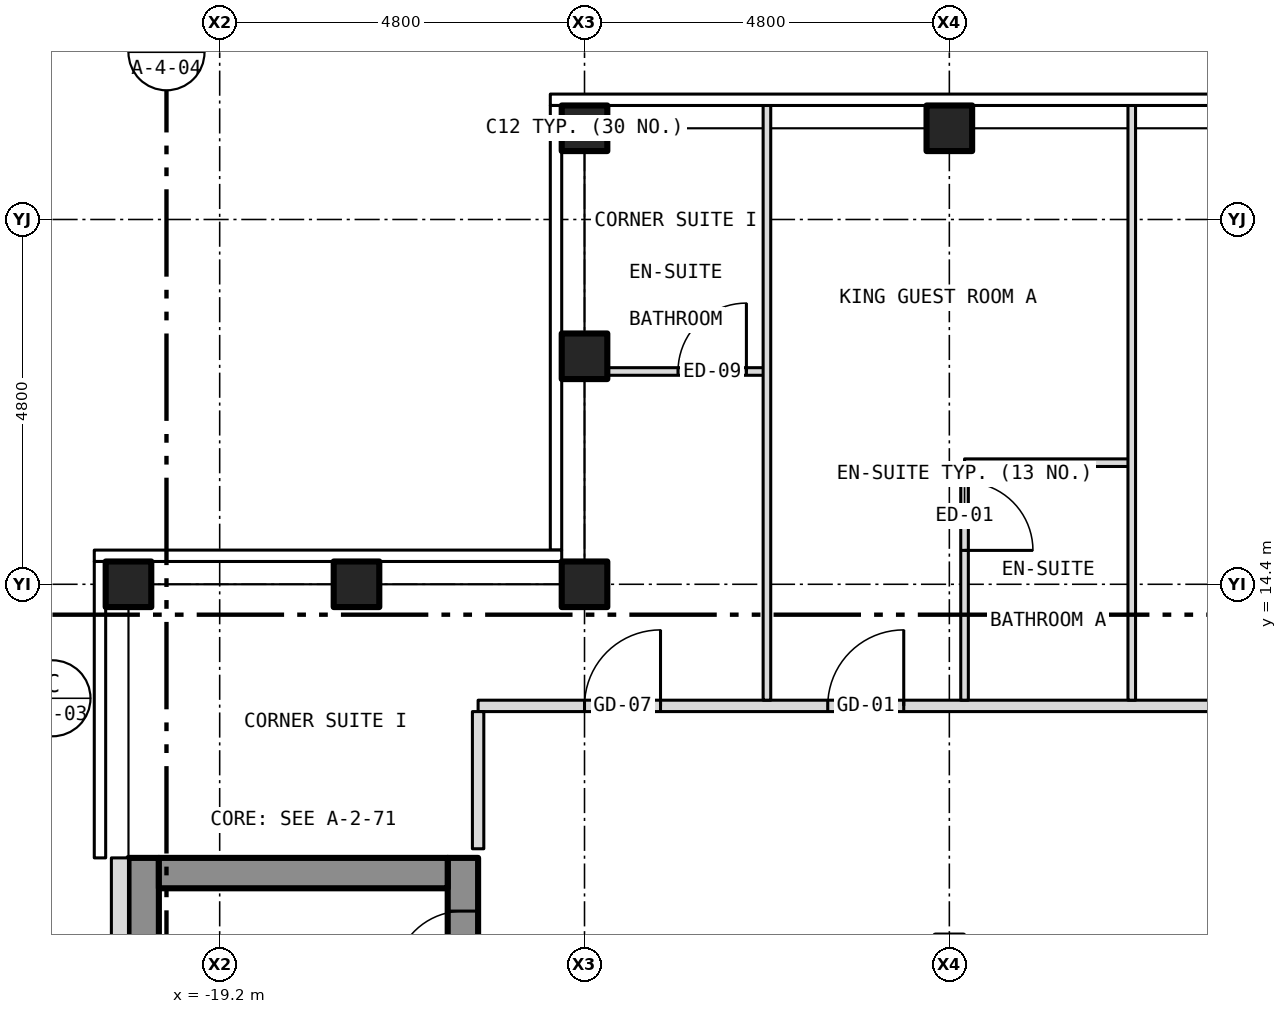
"""IFC4 building model, lengths in metres.
Left out: names, types, materials, properties, quantities, classifications, styles, units other than length and angle.
Written with IfcOpenShell. Run it as: python <this file> out.ifc"""

import sys

from ifc_helpers import new_model, si_unit, direction, frame, frame_2d, origin, origin_2d, place, context, subcontext, project, spatial, rectangle, hollow_rectangle, extrude, element, fill, save


model = new_model("IFC4")
c1 = context("Model", 3, precision=1e-05, world=origin(), true_north=direction((0.0, 1.0)))
c2 = subcontext(c1, "Body", "Model", "MODEL_VIEW")
j1 = project(units=[si_unit("LENGTHUNIT", "METRE"), si_unit("PLANEANGLEUNIT", "RADIAN")], contexts=[c1])
p1 = place(None, origin())
s1 = spatial("IfcSite", under=j1, at=p1, CompositionType="ELEMENT")
p2 = place(p1, origin())
s2 = spatial("IfcBuilding", under=s1, at=p2, CompositionType="ELEMENT")
p3 = place(p2, frame((0.0, 0.0, 258.5)))
s3 = spatial("IfcBuildingStorey", under=s2, at=p3, CompositionType="ELEMENT", Elevation=258.5)
for number, where, z_axis, x_axis in (
    (1, (-14.4, 20.4, -0.15), (0.0, 0.0, 1.0), (1.0, 0.0, 0.0)),
    (2, (-9.6, 20.4, -0.15), (0.0, 0.0, 1.0), (1.0, 0.0, 0.0)),
    (3, (-20.4, 14.4, -0.15), (0.0, 0.0, 1.0), (1.0, 0.0, 0.0)),
    (4, (-14.4, 14.4, -0.15), (0.0, 0.0, 1.0), (1.0, 0.0, 0.0)),
    (5, (-14.4, 17.4, -0.15), (0.0, 0.0, 1.0), (1.0, 0.0, 0.0)),
    (6, (-17.4, 14.4, -0.15), (0.0, 0.0, 1.0), (1.0, 0.0, 0.0)),
):
    element("IfcColumn", number, at=place(p3, frame(where, z_axis=z_axis, x_axis=x_axis)), inside=s3, PredefinedType="COLUMN", context=c2, shape_type="SweptSolid", body=[
        extrude(hollow_rectangle(XDim=0.6, YDim=0.6, WallThickness=0.03, at=origin_2d()), origin(), (0.0, 0.0, 1.0), 3.5),
    ])
p4 = place(p3, frame((-16.0, -10.8, 0.0), z_axis=(0.0, 0.0, 1.0), x_axis=(0.0, 1.0, 0.0)))
e7 = element("IfcWall", 7, at=p4, inside=s3, PredefinedType="SHEAR", context=c2, shape_type="SweptSolid", body=[
    extrude(rectangle(XDim=21.6, YDim=0.4, at=frame_2d((10.8, 0.0))), origin(), (0.0, 0.0, 1.0), 3.25),
])
p5 = place(p4, frame((9.4, 0.0, 0.0)))
e8 = element("IfcOpeningElement", 8, at=p5, cuts=e7, PredefinedType="OPENING", context=c2, shape_type="SweptSolid", body=[
    extrude(rectangle(XDim=1.1, YDim=2.1, at=frame_2d((0.55, 1.05))), frame((0.0, 0.212, 0.0), z_axis=(0.0, -1.0, 0.0), x_axis=(1.0, 0.0, 0.0)), (0.0, 0.0, 1.0), 0.424),
])
p6 = place(p4, frame((11.5, 0.0, 0.0)))
e9 = element("IfcOpeningElement", 9, at=p6, cuts=e7, PredefinedType="OPENING", context=c2, shape_type="SweptSolid", body=[
    extrude(rectangle(XDim=1.1, YDim=2.1, at=frame_2d((0.55, 1.05))), frame((0.0, 0.212, 0.0), z_axis=(0.0, -1.0, 0.0), x_axis=(1.0, 0.0, 0.0)), (0.0, 0.0, 1.0), 0.424),
])
p7 = place(p4, frame((13.6, 0.0, 0.0)))
e10 = element("IfcOpeningElement", 10, at=p7, cuts=e7, PredefinedType="OPENING", context=c2, shape_type="SweptSolid", body=[
    extrude(rectangle(XDim=1.1, YDim=2.1, at=frame_2d((0.55, 1.05))), frame((0.0, 0.212, 0.0), z_axis=(0.0, -1.0, 0.0), x_axis=(1.0, 0.0, 0.0)), (0.0, 0.0, 1.0), 0.424),
])
p8 = place(p4, frame((15.7, 0.0, 0.0)))
e11 = element("IfcOpeningElement", 11, at=p8, cuts=e7, PredefinedType="OPENING", context=c2, shape_type="SweptSolid", body=[
    extrude(rectangle(XDim=1.1, YDim=2.1, at=frame_2d((0.55, 1.05))), frame((0.0, 0.212, 0.0), z_axis=(0.0, -1.0, 0.0), x_axis=(1.0, 0.0, 0.0)), (0.0, 0.0, 1.0), 0.424),
])
p9 = place(p4, frame((17.8, 0.0, 0.0)))
e12 = element("IfcOpeningElement", 12, at=p9, cuts=e7, PredefinedType="OPENING", context=c2, shape_type="SweptSolid", body=[
    extrude(rectangle(XDim=1.1, YDim=2.1, at=frame_2d((0.55, 1.05))), frame((0.0, 0.212, 0.0), z_axis=(0.0, -1.0, 0.0), x_axis=(1.0, 0.0, 0.0)), (0.0, 0.0, 1.0), 0.424),
])
p10 = place(p4, frame((0.458, 0.0, 0.0)))
e13 = element("IfcOpeningElement", 13, at=p10, cuts=e7, PredefinedType="OPENING", context=c2, shape_type="SweptSolid", body=[
    extrude(rectangle(XDim=1.1, YDim=2.1, at=frame_2d((0.55, 1.05))), frame((0.0, 0.212, 0.0), z_axis=(0.0, -1.0, 0.0), x_axis=(1.0, 0.0, 0.0)), (0.0, 0.0, 1.0), 0.424),
])
p11 = place(p4, frame((7.5, 0.0, 0.0)))
e14 = element("IfcOpeningElement", 14, at=p11, cuts=e7, PredefinedType="OPENING", context=c2, shape_type="SweptSolid", body=[
    extrude(rectangle(XDim=1.1, YDim=2.1, at=frame_2d((0.55, 1.05))), frame((0.0, 0.212, 0.0), z_axis=(0.0, -1.0, 0.0), x_axis=(1.0, 0.0, 0.0)), (0.0, 0.0, 1.0), 0.424),
])
p12 = place(p4, frame((20.0, 0.0, 0.0)))
e15 = element("IfcOpeningElement", 15, at=p12, cuts=e7, PredefinedType="OPENING", context=c2, shape_type="SweptSolid", body=[
    extrude(rectangle(XDim=0.9, YDim=2.1, at=frame_2d((0.45, 1.05))), frame((0.0, 0.212, 0.0), z_axis=(0.0, -1.0, 0.0), x_axis=(1.0, 0.0, 0.0)), (0.0, 0.0, 1.0), 0.424),
])
p13 = place(p3, frame((-20.2, -10.8, 0.0), z_axis=(0.0, 0.0, 1.0), x_axis=(0.0, 1.0, 0.0)))
e16 = element("IfcWall", 16, at=p13, inside=s3, PredefinedType="SHEAR", context=c2, shape_type="SweptSolid", body=[
    extrude(rectangle(XDim=21.6, YDim=0.4, at=frame_2d((10.8, 0.0))), origin(), (0.0, 0.0, 1.0), 3.25),
])
p14 = place(p3, frame((-20.0, 10.6, 0.0), z_axis=(0.0, 0.0, 1.0), x_axis=(1.0, 0.0, 0.0)))
e17 = element("IfcWall", 17, at=p14, inside=s3, PredefinedType="SHEAR", context=c2, shape_type="SweptSolid", body=[
    extrude(rectangle(XDim=3.8, YDim=0.4, at=frame_2d((1.9, 0.0))), origin(), (0.0, 0.0, 1.0), 3.25),
])
p15 = place(p3, frame((-20.512, 10.8, 0.0), z_axis=(0.0, 0.0, 1.0), x_axis=(0.0, -1.0, 0.0)))
e18 = element("IfcWall", 18, at=p15, inside=s3, PredefinedType="SOLIDWALL", context=c2, shape_type="SweptSolid", body=[
    extrude(rectangle(XDim=21.6, YDim=0.225, at=frame_2d((10.8, 0.0))), origin(), (0.0, 0.0, 1.0), 3.5),
])
p16 = place(p15, frame((18.05, 0.0, 1.0)))
e19 = element("IfcOpeningElement", 19, at=p16, cuts=e18, PredefinedType="OPENING", context=c2, shape_type="SweptSolid", body=[
    extrude(rectangle(XDim=0.6, YDim=1.5, at=frame_2d((0.3, 0.75))), frame((0.0, 0.125, 0.0), z_axis=(0.0, -1.0, 0.0), x_axis=(1.0, 0.0, 0.0)), (0.0, 0.0, 1.0), 0.249),
])
p17 = place(p3, frame((-15.8, 12.8, 0.0), z_axis=(0.0, 0.0, 1.0), x_axis=(1.0, 0.0, 0.0)))
e20 = element("IfcWall", 20, at=p17, inside=s3, PredefinedType="PARTITIONING", context=c2, shape_type="SweptSolid", body=[
    extrude(rectangle(XDim=31.6, YDim=0.15, at=frame_2d((15.8, 0.0))), origin(), (0.0, 0.0, 1.0), 3.35),
])
p18 = place(p17, frame((4.6, 0.0, 0.0)))
e21 = element("IfcOpeningElement", 21, at=p18, cuts=e20, PredefinedType="OPENING", context=c2, shape_type="SweptSolid", body=[
    extrude(rectangle(XDim=1.0, YDim=2.1, at=frame_2d((0.5, 1.05))), frame((0.0, 0.087, 0.0), z_axis=(0.0, -1.0, 0.0), x_axis=(1.0, 0.0, 0.0)), (0.0, 0.0, 1.0), 0.174),
])
p19 = place(p17, frame((10.6, 0.0, 0.0)))
e22 = element("IfcOpeningElement", 22, at=p19, cuts=e20, PredefinedType="OPENING", context=c2, shape_type="SweptSolid", body=[
    extrude(rectangle(XDim=1.0, YDim=2.1, at=frame_2d((0.5, 1.05))), frame((0.0, 0.087, 0.0), z_axis=(0.0, -1.0, 0.0), x_axis=(1.0, 0.0, 0.0)), (0.0, 0.0, 1.0), 0.174),
])
p20 = place(p17, frame((17.8, 0.0, 0.0)))
e23 = element("IfcOpeningElement", 23, at=p20, cuts=e20, PredefinedType="OPENING", context=c2, shape_type="SweptSolid", body=[
    extrude(rectangle(XDim=1.0, YDim=2.1, at=frame_2d((0.5, 1.05))), frame((0.0, 0.087, 0.0), z_axis=(0.0, -1.0, 0.0), x_axis=(1.0, 0.0, 0.0)), (0.0, 0.0, 1.0), 0.174),
])
p21 = place(p17, frame((26.0, 0.0, 0.0)))
e24 = element("IfcOpeningElement", 24, at=p21, cuts=e20, PredefinedType="OPENING", context=c2, shape_type="SweptSolid", body=[
    extrude(rectangle(XDim=1.0, YDim=2.1, at=frame_2d((0.5, 1.05))), frame((0.0, 0.087, 0.0), z_axis=(0.0, -1.0, 0.0), x_axis=(1.0, 0.0, 0.0)), (0.0, 0.0, 1.0), 0.174),
])
p22 = place(p17, frame((1.4, 0.0, 0.0)))
e25 = element("IfcOpeningElement", 25, at=p22, cuts=e20, PredefinedType="OPENING", context=c2, shape_type="SweptSolid", body=[
    extrude(rectangle(XDim=1.0, YDim=2.1, at=frame_2d((0.5, 1.05))), frame((0.0, 0.087, 0.0), z_axis=(0.0, -1.0, 0.0), x_axis=(1.0, 0.0, 0.0)), (0.0, 0.0, 1.0), 0.174),
])
p23 = place(p17, frame((29.2, 0.0, 0.0)))
e26 = element("IfcOpeningElement", 26, at=p23, cuts=e20, PredefinedType="OPENING", context=c2, shape_type="SweptSolid", body=[
    extrude(rectangle(XDim=1.0, YDim=2.1, at=frame_2d((0.5, 1.05))), frame((0.0, 0.087, 0.0), z_axis=(0.0, -1.0, 0.0), x_axis=(1.0, 0.0, 0.0)), (0.0, 0.0, 1.0), 0.174),
])
p24 = place(p3, frame((-9.4, 16.0, 0.0), z_axis=(0.0, 0.0, 1.0), x_axis=(1.0, 0.0, 0.0)))
e27 = element("IfcWall", 27, at=p24, inside=s3, PredefinedType="PARTITIONING", context=c2, shape_type="SweptSolid", body=[
    extrude(rectangle(XDim=2.2, YDim=0.1, at=frame_2d((1.1, 0.0))), origin(), (0.0, 0.0, 1.0), 3.35),
])
p25 = place(p3, frame((-14.28, 17.2, 0.0), z_axis=(0.0, 0.0, 1.0), x_axis=(1.0, 0.0, 0.0)))
e28 = element("IfcWall", 28, at=p25, inside=s3, PredefinedType="PARTITIONING", context=c2, shape_type="SweptSolid", body=[
    extrude(rectangle(XDim=2.28, YDim=0.1, at=frame_2d((1.14, 0.0))), origin(), (0.0, 0.0, 1.0), 3.35),
])
p26 = place(p25, frame((1.11, 0.0, 0.0)))
e29 = element("IfcOpeningElement", 29, at=p26, cuts=e28, PredefinedType="OPENING", context=c2, shape_type="SweptSolid", body=[
    extrude(rectangle(XDim=0.9, YDim=2.1, at=frame_2d((0.45, 1.05))), frame((0.0, 0.062, 0.0), z_axis=(0.0, -1.0, 0.0), x_axis=(1.0, 0.0, 0.0)), (0.0, 0.0, 1.0), 0.124),
])
p27 = place(p3, frame((-15.8, 10.92, 0.0), z_axis=(0.0, 0.0, 1.0), x_axis=(0.0, 1.0, 0.0)))
e30 = element("IfcWall", 30, at=p27, inside=s3, PredefinedType="PARTITIONING", context=c2, shape_type="SweptSolid", body=[
    extrude(rectangle(XDim=1.805, YDim=0.15, at=frame_2d((0.903, 0.0))), origin(), (0.0, 0.0, 1.0), 3.35),
])
p28 = place(p3, frame((-12.0, 12.875, 0.0), z_axis=(0.0, 0.0, 1.0), x_axis=(0.0, 1.0, 0.0)))
e31 = element("IfcWall", 31, at=p28, inside=s3, PredefinedType="PARTITIONING", context=c2, shape_type="SweptSolid", body=[
    extrude(rectangle(XDim=7.855, YDim=0.1, at=frame_2d((3.927, 0.0))), origin(), (0.0, 0.0, 1.0), 3.35),
])
p29 = place(p3, frame((-9.4, 12.875, 0.0), z_axis=(0.0, 0.0, 1.0), x_axis=(0.0, 1.0, 0.0)))
e32 = element("IfcWall", 32, at=p29, inside=s3, PredefinedType="PARTITIONING", context=c2, shape_type="SweptSolid", body=[
    extrude(rectangle(XDim=3.075, YDim=0.1, at=frame_2d((1.538, 0.0))), origin(), (0.0, 0.0, 1.0), 2.728),
])
p30 = place(p29, frame((1.971, 0.0, 0.0)))
e33 = element("IfcOpeningElement", 33, at=p30, cuts=e32, PredefinedType="OPENING", context=c2, shape_type="SweptSolid", body=[
    extrude(rectangle(XDim=0.9, YDim=2.1, at=frame_2d((0.45, 1.05))), frame((0.0, 0.062, 0.0), z_axis=(0.0, -1.0, 0.0), x_axis=(1.0, 0.0, 0.0)), (0.0, 0.0, 1.0), 0.124),
])
p31 = place(p3, frame((-7.2, 12.875, 0.0), z_axis=(0.0, 0.0, 1.0), x_axis=(0.0, 1.0, 0.0)))
e34 = element("IfcWall", 34, at=p31, inside=s3, PredefinedType="PARTITIONING", context=c2, shape_type="SweptSolid", body=[
    extrude(rectangle(XDim=7.855, YDim=0.1, at=frame_2d((3.927, 0.0))), origin(), (0.0, 0.0, 1.0), 3.35),
])
p32 = place(p12, origin())
e35 = element("IfcDoor", 35, at=p32, inside=s3, OperationType="SINGLE_SWING_LEFT", PredefinedType="DOOR", context=c2, shape_type="SweptSolid", body=[
    extrude(rectangle(XDim=0.9, YDim=2.1, at=frame_2d((0.45, 1.05))), frame((0.0, 0.025, 0.0), z_axis=(0.0, -1.0, 0.0), x_axis=(1.0, 0.0, 0.0)), (0.0, 0.0, 1.0), 0.05),
])
fill(e15, e35)
p33 = place(p18, origin())
e36 = element("IfcDoor", 36, at=p33, inside=s3, OperationType="SINGLE_SWING_RIGHT", PredefinedType="DOOR", context=c2, shape_type="SweptSolid", body=[
    extrude(rectangle(XDim=1.0, YDim=2.1, at=frame_2d((0.5, 1.05))), frame((0.0, 0.025, 0.0), z_axis=(0.0, -1.0, 0.0), x_axis=(1.0, 0.0, 0.0)), (0.0, 0.0, 1.0), 0.05),
])
fill(e21, e36)
p34 = place(p30, origin())
e37 = element("IfcDoor", 37, at=p34, inside=s3, OperationType="SINGLE_SWING_LEFT", PredefinedType="DOOR", context=c2, shape_type="SweptSolid", body=[
    extrude(rectangle(XDim=0.9, YDim=2.1, at=frame_2d((0.45, 1.05))), frame((0.0, 0.025, 0.0), z_axis=(0.0, -1.0, 0.0), x_axis=(1.0, 0.0, 0.0)), (0.0, 0.0, 1.0), 0.05),
])
fill(e33, e37)
p35 = place(p26, origin())
e38 = element("IfcDoor", 38, at=p35, inside=s3, OperationType="SINGLE_SWING_RIGHT", PredefinedType="DOOR", context=c2, shape_type="SweptSolid", body=[
    extrude(rectangle(XDim=0.9, YDim=2.1, at=frame_2d((0.45, 1.05))), frame((0.0, 0.025, 0.0), z_axis=(0.0, -1.0, 0.0), x_axis=(1.0, 0.0, 0.0)), (0.0, 0.0, 1.0), 0.05),
])
fill(e29, e38)
p36 = place(p22, origin())
e39 = element("IfcDoor", 39, at=p36, inside=s3, OperationType="SINGLE_SWING_RIGHT", PredefinedType="DOOR", context=c2, shape_type="SweptSolid", body=[
    extrude(rectangle(XDim=1.0, YDim=2.1, at=frame_2d((0.5, 1.05))), frame((0.0, 0.025, 0.0), z_axis=(0.0, -1.0, 0.0), x_axis=(1.0, 0.0, 0.0)), (0.0, 0.0, 1.0), 0.05),
])
fill(e25, e39)
save(model, sys.argv[1])
